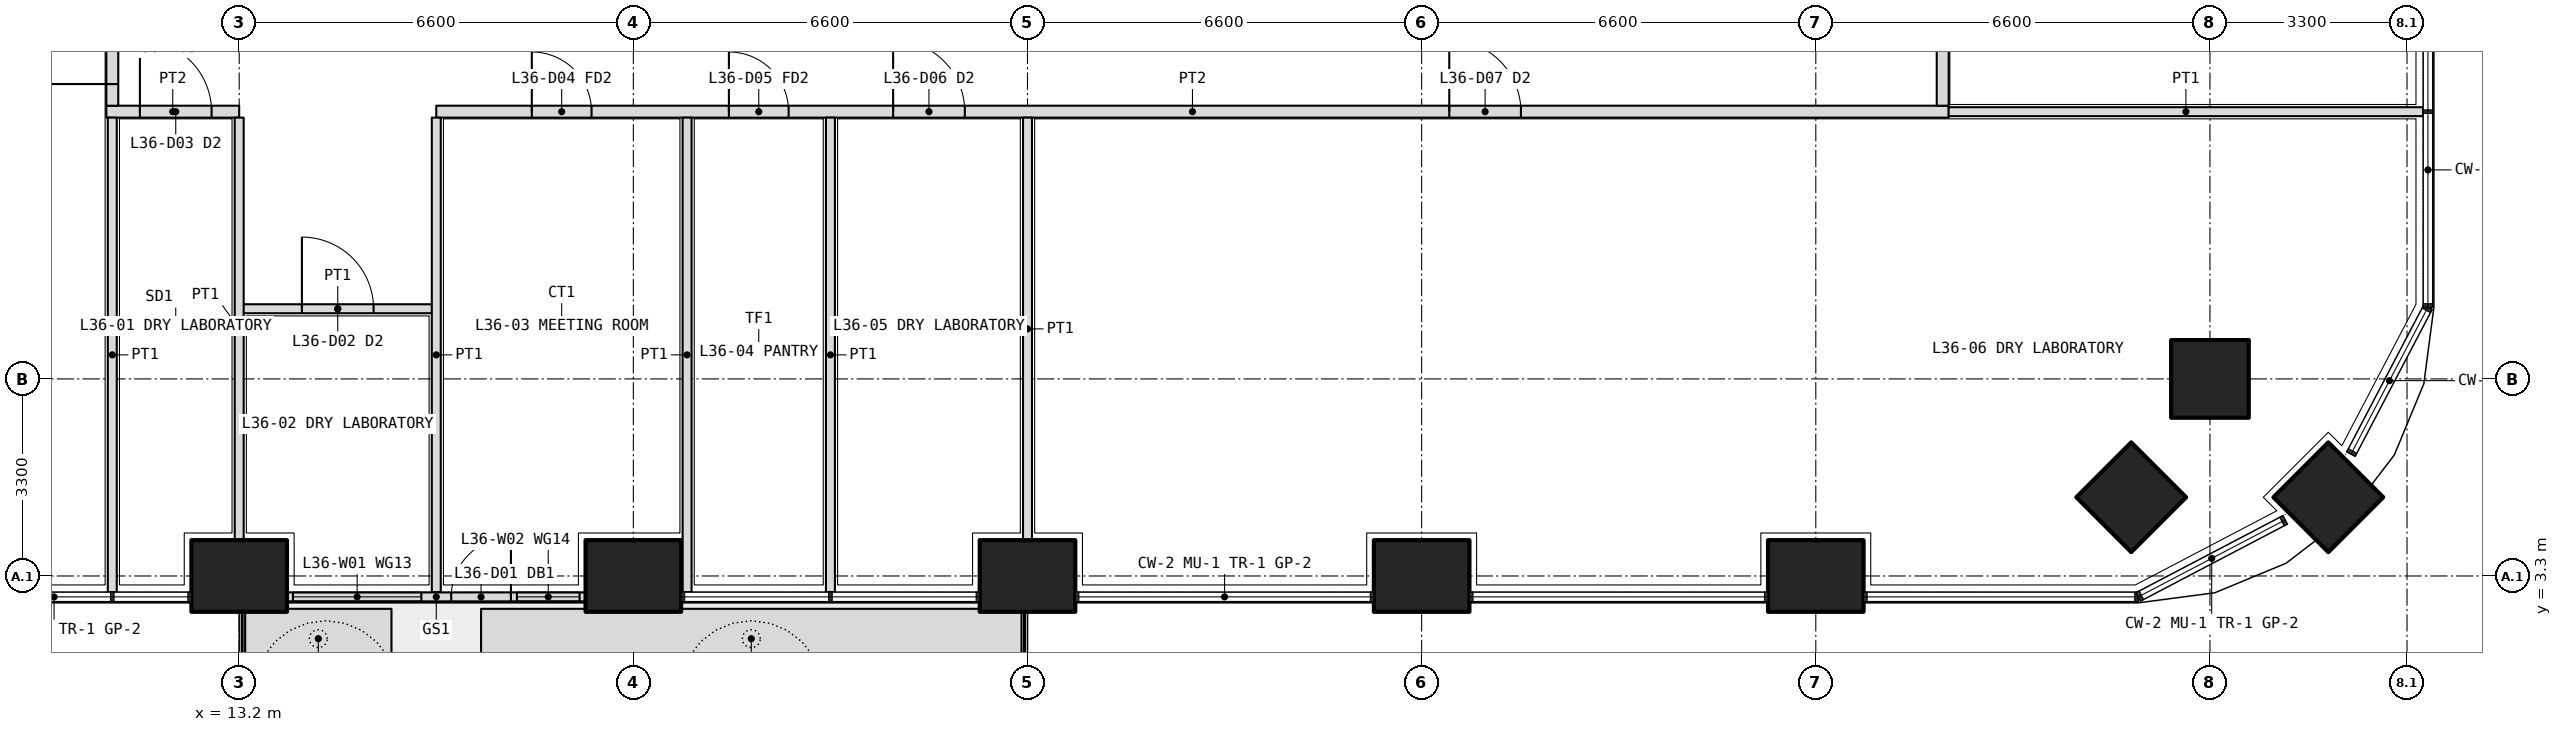
"""IFC4 building model, lengths in metres.
Left out: names, types, materials, properties, quantities, classifications, styles, units other than length and angle.
Written with IfcOpenShell. Run it as: python <this file> out.ifc"""

import sys

from ifc_helpers import new_model, si_unit, direction, frame, frame_2d, origin, origin_2d, place, context, subcontext, project, spatial, polyline, rectangle, outline, extrude, element, fill, save


model = new_model("IFC4")
c1 = context("Model", 3, precision=1e-05, world=origin(), true_north=direction((0.0, 1.0)))
c2 = subcontext(c1, "Body", "Model", "MODEL_VIEW")
j1 = project(units=[si_unit("LENGTHUNIT", "METRE"), si_unit("PLANEANGLEUNIT", "RADIAN")], contexts=[c1])
p1 = place(None, origin())
s1 = spatial("IfcSite", under=j1, at=p1, CompositionType="ELEMENT")
p2 = place(p1, origin())
s2 = spatial("IfcBuilding", under=s1, at=p2, CompositionType="ELEMENT")
p3 = place(p2, frame((0.0, 0.0, 159.9)))
s3 = spatial("IfcBuildingStorey", under=s2, at=p3, CompositionType="ELEMENT", Elevation=159.9)
p4 = place(p3, frame((48.182, 4.618, 0.0), z_axis=(0.0, 0.0, 1.0), x_axis=(0.707106781187, 0.707106781187, 0.0)))
e1 = element("IfcColumn", 1, at=p4, inside=s3, PredefinedType="COLUMN", context=c2, shape_type="SweptSolid", body=[
    extrude(rectangle(XDim=1.3, YDim=1.3, at=origin_2d()), origin(), (0.0, 0.0, 1.0), 4.2),
])
for number, where, z_axis, x_axis in (
    (2, (13.2, 3.3, 0.0), (0.0, 0.0, 1.0), (1.0, 0.0, 0.0)),
    (3, (19.8, 3.3, 0.0), (0.0, 0.0, 1.0), (1.0, 0.0, 0.0)),
    (4, (26.4, 3.3, 0.0), (0.0, 0.0, 1.0), (1.0, 0.0, 0.0)),
    (5, (33.0, 3.3, 0.0), (0.0, 0.0, 1.0), (1.0, 0.0, 0.0)),
    (6, (39.6, 3.3, 0.0), (0.0, 0.0, 1.0), (1.0, 0.0, 0.0)),
):
    element("IfcColumn", number, at=place(p3, frame(where, z_axis=z_axis, x_axis=x_axis)), inside=s3, PredefinedType="COLUMN", context=c2, shape_type="SweptSolid", body=[
        extrude(rectangle(XDim=1.6, YDim=1.2, at=origin_2d()), origin(), (0.0, 0.0, 1.0), 4.2),
    ])
for number, where, z_axis, x_axis in (
    (7, (46.2, 6.6, 0.0), (0.0, 0.0, 1.0), (1.0, 0.0, 0.0)),
    (8, (44.882, 4.618, 0.0), (0.0, 0.0, 1.0), (0.707, 0.707, 0.0)),
):
    element("IfcColumn", number, at=place(p3, frame(where, z_axis=z_axis, x_axis=x_axis)), inside=s3, PredefinedType="COLUMN", context=c2, shape_type="SweptSolid", body=[
        extrude(rectangle(XDim=1.3, YDim=1.3, at=origin_2d()), origin(), (0.0, 0.0, 1.0), 4.2),
    ])
p5 = place(p3, origin())
e9 = element("IfcWall", 9, at=p5, inside=s3, PredefinedType="USERDEFINED", context=c2, shape_type="SweptSolid", body=[
    extrude(outline(polyline([(13.3, 1.75), (15.75, 1.75), (15.75, 2.75), (13.3, 2.75), (13.3, 1.75)]), holes=[polyline([(13.45, 1.9), (15.6, 1.9), (15.6, 2.6), (13.45, 2.6), (13.45, 1.9)])]), origin(), (0.0, 0.0, 1.0), 1.05),
])
p6 = place(p3, origin())
e10 = element("IfcWall", 10, at=p6, inside=s3, PredefinedType="USERDEFINED", context=c2, shape_type="SweptSolid", body=[
    extrude(outline(polyline([(17.25, 1.75), (26.3, 1.75), (26.3, 2.75), (17.25, 2.75), (17.25, 1.75)]), holes=[polyline([(17.4, 1.9), (26.15, 1.9), (26.15, 2.6), (17.4, 2.6), (17.4, 1.9)])]), origin(), (0.0, 0.0, 1.0), 1.05),
])
p7 = place(p3, frame((14.0, 2.95, 0.0), z_axis=(0.0, 0.0, 1.0), x_axis=(1.0, 0.0, 0.0)))
e11 = element("IfcWall", 11, at=p7, inside=s3, PredefinedType="SOLIDWALL", context=c2, shape_type="SweptSolid", body=[
    extrude(rectangle(XDim=5.0, YDim=0.15, at=frame_2d((2.5, 0.0))), origin(), (0.0, 0.0, 1.0), 2.7),
])
p8 = place(p7, frame((2.75, 0.0, 0.0)))
e12 = element("IfcOpeningElement", 12, at=p8, cuts=e11, PredefinedType="OPENING", context=c2, shape_type="SweptSolid", body=[
    extrude(rectangle(XDim=1.0, YDim=2.4, at=frame_2d((0.5, 1.2))), frame((0.0, 0.085, 0.0), z_axis=(0.0, -1.0, 0.0), x_axis=(1.0, 0.0, 0.0)), (0.0, 0.0, 1.0), 0.17),
])
p9 = place(p7, frame((0.1, 0.0, 0.1)))
e13 = element("IfcOpeningElement", 13, at=p9, cuts=e11, PredefinedType="OPENING", context=c2, shape_type="SweptSolid", body=[
    extrude(rectangle(XDim=2.15, YDim=2.3, at=frame_2d((1.075, 1.15))), frame((0.0, 0.085, 0.0), z_axis=(0.0, -1.0, 0.0), x_axis=(1.0, 0.0, 0.0)), (0.0, 0.0, 1.0), 0.17),
])
p10 = place(p7, frame((3.85, 0.0, 0.1)))
e14 = element("IfcOpeningElement", 14, at=p10, cuts=e11, PredefinedType="OPENING", context=c2, shape_type="SweptSolid", body=[
    extrude(rectangle(XDim=1.05, YDim=2.3, at=frame_2d((0.525, 1.15))), frame((0.0, 0.085, 0.0), z_axis=(0.0, -1.0, 0.0), x_axis=(1.0, 0.0, 0.0)), (0.0, 0.0, 1.0), 0.17),
])
p11 = place(p3, frame((10.975, 11.075, 0.0), z_axis=(0.0, 0.0, 1.0), x_axis=(1.0, 0.0, 0.0)))
e15 = element("IfcWall", 15, at=p11, inside=s3, PredefinedType="PARTITIONING", context=c2, shape_type="SweptSolid", body=[
    extrude(rectangle(XDim=2.225, YDim=0.2, at=frame_2d((1.112, 0.0))), origin(), (0.0, 0.0, 1.0), 2.85),
])
p12 = place(p11, frame((0.562, 0.0, 0.0)))
e16 = element("IfcOpeningElement", 16, at=p12, cuts=e15, PredefinedType="OPENING", context=c2, shape_type="SweptSolid", body=[
    extrude(rectangle(XDim=1.2, YDim=2.1, at=frame_2d((0.6, 1.05))), frame((0.0, 0.11, 0.0), z_axis=(0.0, -1.0, 0.0), x_axis=(1.0, 0.0, 0.0)), (0.0, 0.0, 1.0), 0.22),
])
p13 = place(p3, frame((16.5, 11.075, 0.0), z_axis=(0.0, 0.0, 1.0), x_axis=(1.0, 0.0, 0.0)))
e17 = element("IfcWall", 17, at=p13, inside=s3, PredefinedType="PARTITIONING", context=c2, shape_type="SweptSolid", body=[
    extrude(rectangle(XDim=25.325, YDim=0.2, at=frame_2d((12.663, 0.0))), origin(), (0.0, 0.0, 1.0), 2.85),
])
p14 = place(p13, frame((1.6, 0.0, 0.0)))
e18 = element("IfcOpeningElement", 18, at=p14, cuts=e17, PredefinedType="OPENING", context=c2, shape_type="SweptSolid", body=[
    extrude(rectangle(XDim=1.0, YDim=2.1, at=frame_2d((0.5, 1.05))), frame((0.0, 0.11, 0.0), z_axis=(0.0, -1.0, 0.0), x_axis=(1.0, 0.0, 0.0)), (0.0, 0.0, 1.0), 0.22),
])
p15 = place(p13, frame((4.9, 0.0, 0.0)))
e19 = element("IfcOpeningElement", 19, at=p15, cuts=e17, PredefinedType="OPENING", context=c2, shape_type="SweptSolid", body=[
    extrude(rectangle(XDim=1.0, YDim=2.1, at=frame_2d((0.5, 1.05))), frame((0.0, 0.11, 0.0), z_axis=(0.0, -1.0, 0.0), x_axis=(1.0, 0.0, 0.0)), (0.0, 0.0, 1.0), 0.22),
])
p16 = place(p13, frame((7.65, 0.0, 0.0)))
e20 = element("IfcOpeningElement", 20, at=p16, cuts=e17, PredefinedType="OPENING", context=c2, shape_type="SweptSolid", body=[
    extrude(rectangle(XDim=1.2, YDim=2.1, at=frame_2d((0.6, 1.05))), frame((0.0, 0.11, 0.0), z_axis=(0.0, -1.0, 0.0), x_axis=(1.0, 0.0, 0.0)), (0.0, 0.0, 1.0), 0.22),
])
p17 = place(p13, frame((16.962, 0.0, 0.0)))
e21 = element("IfcOpeningElement", 21, at=p17, cuts=e17, PredefinedType="OPENING", context=c2, shape_type="SweptSolid", body=[
    extrude(rectangle(XDim=1.2, YDim=2.1, at=frame_2d((0.6, 1.05))), frame((0.0, 0.11, 0.0), z_axis=(0.0, -1.0, 0.0), x_axis=(1.0, 0.0, 0.0)), (0.0, 0.0, 1.0), 0.22),
])
p18 = place(p3, frame((11.075, 11.175, 0.0), z_axis=(0.0, 0.0, 1.0), x_axis=(0.0, 1.0, 0.0)))
e22 = element("IfcWall", 22, at=p18, inside=s3, PredefinedType="PARTITIONING", context=c2, shape_type="SweptSolid", body=[
    extrude(rectangle(XDim=23.85, YDim=0.2, at=frame_2d((11.925, 0.0))), origin(), (0.0, 0.0, 1.0), 2.85),
])
p19 = place(p18, frame((0.363, 0.0, 0.0)))
e23 = element("IfcOpeningElement", 23, at=p19, cuts=e22, PredefinedType="OPENING", context=c2, shape_type="SweptSolid", body=[
    extrude(rectangle(XDim=1.2, YDim=2.1, at=frame_2d((0.6, 1.05))), frame((0.0, 0.11, 0.0), z_axis=(0.0, -1.0, 0.0), x_axis=(1.0, 0.0, 0.0)), (0.0, 0.0, 1.0), 0.22),
])
p20 = place(p18, frame((3.125, 0.0, 0.0)))
e24 = element("IfcOpeningElement", 24, at=p20, cuts=e22, PredefinedType="OPENING", context=c2, shape_type="SweptSolid", body=[
    extrude(rectangle(XDim=1.0, YDim=2.1, at=frame_2d((0.5, 1.05))), frame((0.0, 0.11, 0.0), z_axis=(0.0, -1.0, 0.0), x_axis=(1.0, 0.0, 0.0)), (0.0, 0.0, 1.0), 0.22),
])
p21 = place(p18, frame((6.475, 0.0, 0.0)))
e25 = element("IfcOpeningElement", 25, at=p21, cuts=e22, PredefinedType="OPENING", context=c2, shape_type="SweptSolid", body=[
    extrude(rectangle(XDim=0.9, YDim=2.1, at=frame_2d((0.45, 1.05))), frame((0.0, 0.11, 0.0), z_axis=(0.0, -1.0, 0.0), x_axis=(1.0, 0.0, 0.0)), (0.0, 0.0, 1.0), 0.22),
])
p22 = place(p18, frame((9.675, 0.0, 0.0)))
e26 = element("IfcOpeningElement", 26, at=p22, cuts=e22, PredefinedType="OPENING", context=c2, shape_type="SweptSolid", body=[
    extrude(rectangle(XDim=0.9, YDim=2.1, at=frame_2d((0.45, 1.05))), frame((0.0, 0.11, 0.0), z_axis=(0.0, -1.0, 0.0), x_axis=(1.0, 0.0, 0.0)), (0.0, 0.0, 1.0), 0.22),
])
p23 = place(p18, frame((12.925, 0.0, 0.0)))
e27 = element("IfcOpeningElement", 27, at=p23, cuts=e22, PredefinedType="OPENING", context=c2, shape_type="SweptSolid", body=[
    extrude(rectangle(XDim=1.0, YDim=2.1, at=frame_2d((0.5, 1.05))), frame((0.0, 0.11, 0.0), z_axis=(0.0, -1.0, 0.0), x_axis=(1.0, 0.0, 0.0)), (0.0, 0.0, 1.0), 0.22),
])
p24 = place(p18, frame((16.375, 0.0, 0.0)))
e28 = element("IfcOpeningElement", 28, at=p24, cuts=e22, PredefinedType="OPENING", context=c2, shape_type="SweptSolid", body=[
    extrude(rectangle(XDim=1.0, YDim=2.1, at=frame_2d((0.5, 1.05))), frame((0.0, 0.11, 0.0), z_axis=(0.0, -1.0, 0.0), x_axis=(1.0, 0.0, 0.0)), (0.0, 0.0, 1.0), 0.22),
])
p25 = place(p18, frame((20.637, 0.0, 0.0)))
e29 = element("IfcOpeningElement", 29, at=p25, cuts=e22, PredefinedType="OPENING", context=c2, shape_type="SweptSolid", body=[
    extrude(rectangle(XDim=1.2, YDim=2.1, at=frame_2d((0.6, 1.05))), frame((0.0, 0.11, 0.0), z_axis=(0.0, -1.0, 0.0), x_axis=(1.0, 0.0, 0.0)), (0.0, 0.0, 1.0), 0.22),
])
p26 = place(p3, frame((41.725, 11.175, 0.0), z_axis=(0.0, 0.0, 1.0), x_axis=(0.0, 1.0, 0.0)))
e30 = element("IfcWall", 30, at=p26, inside=s3, PredefinedType="PARTITIONING", context=c2, shape_type="SweptSolid", body=[
    extrude(rectangle(XDim=23.85, YDim=0.2, at=frame_2d((11.925, 0.0))), origin(), (0.0, 0.0, 1.0), 2.85),
])
p27 = place(p26, frame((3.762, 0.0, 0.0)))
e31 = element("IfcOpeningElement", 31, at=p27, cuts=e30, PredefinedType="OPENING", context=c2, shape_type="SweptSolid", body=[
    extrude(rectangle(XDim=1.0, YDim=2.1, at=frame_2d((0.5, 1.05))), frame((0.0, 0.11, 0.0), z_axis=(0.0, -1.0, 0.0), x_axis=(1.0, 0.0, 0.0)), (0.0, 0.0, 1.0), 0.22),
])
p28 = place(p26, frame((9.625, 0.0, 0.0)))
e32 = element("IfcOpeningElement", 32, at=p28, cuts=e30, PredefinedType="OPENING", context=c2, shape_type="SweptSolid", body=[
    extrude(rectangle(XDim=1.0, YDim=2.1, at=frame_2d((0.5, 1.05))), frame((0.0, 0.11, 0.0), z_axis=(0.0, -1.0, 0.0), x_axis=(1.0, 0.0, 0.0)), (0.0, 0.0, 1.0), 0.22),
])
p29 = place(p26, frame((12.975, 0.0, 0.0)))
e33 = element("IfcOpeningElement", 33, at=p29, cuts=e30, PredefinedType="OPENING", context=c2, shape_type="SweptSolid", body=[
    extrude(rectangle(XDim=0.9, YDim=2.1, at=frame_2d((0.45, 1.05))), frame((0.0, 0.11, 0.0), z_axis=(0.0, -1.0, 0.0), x_axis=(1.0, 0.0, 0.0)), (0.0, 0.0, 1.0), 0.22),
])
p30 = place(p26, frame((19.087, 0.0, 0.0)))
e34 = element("IfcOpeningElement", 34, at=p30, cuts=e30, PredefinedType="OPENING", context=c2, shape_type="SweptSolid", body=[
    extrude(rectangle(XDim=1.0, YDim=2.1, at=frame_2d((0.5, 1.05))), frame((0.0, 0.11, 0.0), z_axis=(0.0, -1.0, 0.0), x_axis=(1.0, 0.0, 0.0)), (0.0, 0.0, 1.0), 0.22),
])
for number, where, z_axis, x_axis in (
    (35, (11.075, 3.03, 0.0), (0.0, 0.0, 1.0), (0.0, 1.0, 0.0)),
    (36, (49.77, 11.075, 0.0), (0.0, 0.0, 1.0), (-1.0, 0.0, 0.0)),
):
    element("IfcWall", number, at=place(p3, frame(where, z_axis=z_axis, x_axis=x_axis)), inside=s3, PredefinedType="PARTITIONING", context=c2, shape_type="SweptSolid", body=[
        extrude(rectangle(XDim=7.945, YDim=0.15, at=frame_2d((3.973, 0.0))), origin(), (0.0, 0.0, 1.0), 2.7),
    ])
p31 = place(p3, frame((13.2, 7.775, 0.0), z_axis=(0.0, 0.0, 1.0), x_axis=(1.0, 0.0, 0.0)))
e37 = element("IfcWall", 37, at=p31, inside=s3, PredefinedType="PARTITIONING", context=c2, shape_type="SweptSolid", body=[
    extrude(rectangle(XDim=3.3, YDim=0.15, at=frame_2d((1.65, 0.0))), origin(), (0.0, 0.0, 1.0), 2.85),
])
p32 = place(p31, frame((1.05, 0.0, 0.0)))
e38 = element("IfcOpeningElement", 38, at=p32, cuts=e37, PredefinedType="OPENING", context=c2, shape_type="SweptSolid", body=[
    extrude(rectangle(XDim=1.2, YDim=2.1, at=frame_2d((0.6, 1.05))), frame((0.0, 0.085, 0.0), z_axis=(0.0, -1.0, 0.0), x_axis=(1.0, 0.0, 0.0)), (0.0, 0.0, 1.0), 0.17),
])
for number, where, z_axis, x_axis in (
    (39, (20.7, 3.03, 0.0), (0.0, 0.0, 1.0), (0.0, 1.0, 0.0)),
    (40, (23.1, 3.03, 0.0), (0.0, 0.0, 1.0), (0.0, 1.0, 0.0)),
):
    element("IfcWall", number, at=place(p3, frame(where, z_axis=z_axis, x_axis=x_axis)), inside=s3, PredefinedType="PARTITIONING", context=c2, shape_type="SweptSolid", body=[
        extrude(rectangle(XDim=7.945, YDim=0.15, at=frame_2d((3.973, 0.0))), origin(), (0.0, 0.0, 1.0), 2.7),
    ])
p33 = place(p3, frame((13.2, 3.9, 0.0), z_axis=(0.0, 0.0, 1.0), x_axis=(0.0, 1.0, 0.0)))
e41 = element("IfcWall", 41, at=p33, inside=s3, PredefinedType="PARTITIONING", context=c2, shape_type="SweptSolid", body=[
    extrude(rectangle(XDim=7.075, YDim=0.15, at=frame_2d((3.538, 0.0))), origin(), (0.0, 0.0, 1.0), 2.85),
])
p34 = place(p3, frame((16.5, 3.03, 0.0), z_axis=(0.0, 0.0, 1.0), x_axis=(0.0, 1.0, 0.0)))
e42 = element("IfcWall", 42, at=p34, inside=s3, PredefinedType="PARTITIONING", context=c2, shape_type="SweptSolid", body=[
    extrude(rectangle(XDim=7.945, YDim=0.15, at=frame_2d((3.973, 0.0))), origin(), (0.0, 0.0, 1.0), 2.7),
])
p35 = place(p3, frame((26.4, 3.9, 0.0), z_axis=(0.0, 0.0, 1.0), x_axis=(0.0, 1.0, 0.0)))
e43 = element("IfcWall", 43, at=p35, inside=s3, PredefinedType="PARTITIONING", context=c2, shape_type="SweptSolid", body=[
    extrude(rectangle(XDim=7.075, YDim=0.15, at=frame_2d((3.538, 0.0))), origin(), (0.0, 0.0, 1.0), 2.85),
])
p36 = place(p8, origin())
e44 = element("IfcDoor", 44, at=p36, inside=s3, OperationType="SINGLE_SWING_RIGHT", PredefinedType="DOOR", context=c2, shape_type="SweptSolid", body=[
    extrude(rectangle(XDim=1.0, YDim=2.4, at=frame_2d((0.5, 1.2))), frame((0.0, 0.025, 0.0), z_axis=(0.0, -1.0, 0.0), x_axis=(1.0, 0.0, 0.0)), (0.0, 0.0, 1.0), 0.05),
])
fill(e12, e44)
p37 = place(p9, origin())
e45 = element("IfcWindow", 45, at=p37, inside=s3, PartitioningType="SINGLE_PANEL", PredefinedType="WINDOW", context=c2, shape_type="SweptSolid", body=[
    extrude(rectangle(XDim=2.15, YDim=2.3, at=frame_2d((1.075, 1.15))), frame((0.0, 0.03, 0.0), z_axis=(0.0, -1.0, 0.0), x_axis=(1.0, 0.0, 0.0)), (0.0, 0.0, 1.0), 0.06),
])
fill(e13, e45)
p38 = place(p10, origin())
e46 = element("IfcWindow", 46, at=p38, inside=s3, PartitioningType="SINGLE_PANEL", PredefinedType="WINDOW", context=c2, shape_type="SweptSolid", body=[
    extrude(rectangle(XDim=1.05, YDim=2.3, at=frame_2d((0.525, 1.15))), frame((0.0, 0.03, 0.0), z_axis=(0.0, -1.0, 0.0), x_axis=(1.0, 0.0, 0.0)), (0.0, 0.0, 1.0), 0.06),
])
fill(e14, e46)
p39 = place(p12, origin())
e47 = element("IfcDoor", 47, at=p39, inside=s3, OperationType="DOUBLE_DOOR_SINGLE_SWING", PredefinedType="DOOR", context=c2, shape_type="SweptSolid", body=[
    extrude(rectangle(XDim=1.2, YDim=2.1, at=frame_2d((0.6, 1.05))), frame((0.0, 0.025, 0.0), z_axis=(0.0, -1.0, 0.0), x_axis=(1.0, 0.0, 0.0)), (0.0, 0.0, 1.0), 0.05),
])
fill(e16, e47)
p40 = place(p32, origin())
e48 = element("IfcDoor", 48, at=p40, inside=s3, OperationType="DOUBLE_DOOR_SINGLE_SWING", PredefinedType="DOOR", context=c2, shape_type="SweptSolid", body=[
    extrude(rectangle(XDim=1.2, YDim=2.1, at=frame_2d((0.6, 1.05))), frame((0.0, 0.025, 0.0), z_axis=(0.0, -1.0, 0.0), x_axis=(1.0, 0.0, 0.0)), (0.0, 0.0, 1.0), 0.05),
])
fill(e38, e48)
p41 = place(p14, origin())
e49 = element("IfcDoor", 49, at=p41, inside=s3, OperationType="SINGLE_SWING_LEFT", PredefinedType="DOOR", context=c2, shape_type="SweptSolid", body=[
    extrude(rectangle(XDim=1.0, YDim=2.1, at=frame_2d((0.5, 1.05))), frame((0.0, 0.025, 0.0), z_axis=(0.0, -1.0, 0.0), x_axis=(1.0, 0.0, 0.0)), (0.0, 0.0, 1.0), 0.05),
])
fill(e18, e49)
p42 = place(p15, origin())
e50 = element("IfcDoor", 50, at=p42, inside=s3, OperationType="SINGLE_SWING_LEFT", PredefinedType="DOOR", context=c2, shape_type="SweptSolid", body=[
    extrude(rectangle(XDim=1.0, YDim=2.1, at=frame_2d((0.5, 1.05))), frame((0.0, 0.025, 0.0), z_axis=(0.0, -1.0, 0.0), x_axis=(1.0, 0.0, 0.0)), (0.0, 0.0, 1.0), 0.05),
])
fill(e19, e50)
p43 = place(p16, origin())
e51 = element("IfcDoor", 51, at=p43, inside=s3, OperationType="DOUBLE_DOOR_SINGLE_SWING", PredefinedType="DOOR", context=c2, shape_type="SweptSolid", body=[
    extrude(rectangle(XDim=1.2, YDim=2.1, at=frame_2d((0.6, 1.05))), frame((0.0, 0.025, 0.0), z_axis=(0.0, -1.0, 0.0), x_axis=(1.0, 0.0, 0.0)), (0.0, 0.0, 1.0), 0.05),
])
fill(e20, e51)
p44 = place(p17, origin())
e52 = element("IfcDoor", 52, at=p44, inside=s3, OperationType="DOUBLE_DOOR_SINGLE_SWING", PredefinedType="DOOR", context=c2, shape_type="SweptSolid", body=[
    extrude(rectangle(XDim=1.2, YDim=2.1, at=frame_2d((0.6, 1.05))), frame((0.0, 0.025, 0.0), z_axis=(0.0, -1.0, 0.0), x_axis=(1.0, 0.0, 0.0)), (0.0, 0.0, 1.0), 0.05),
])
fill(e21, e52)
p45 = place(p19, origin())
e53 = element("IfcDoor", 53, at=p45, inside=s3, OperationType="DOUBLE_DOOR_SINGLE_SWING", PredefinedType="DOOR", context=c2, shape_type="SweptSolid", body=[
    extrude(rectangle(XDim=1.2, YDim=2.1, at=frame_2d((0.6, 1.05))), frame((0.0, 0.025, 0.0), z_axis=(0.0, -1.0, 0.0), x_axis=(1.0, 0.0, 0.0)), (0.0, 0.0, 1.0), 0.05),
])
fill(e23, e53)
save(model, sys.argv[1])
